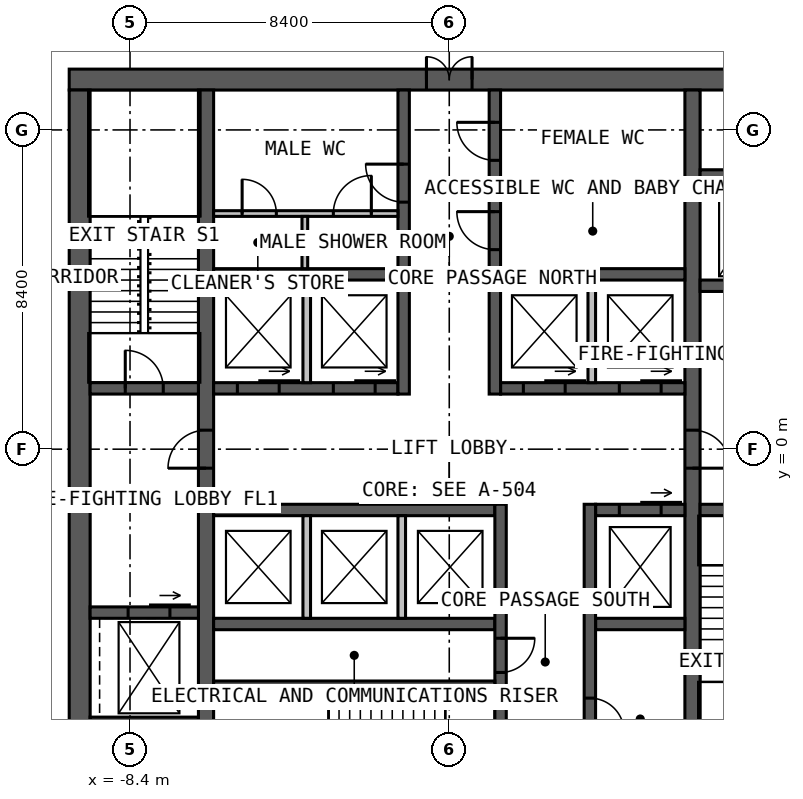
"""IFC4 building model, lengths in metres.
Left out: names, types, materials, properties, quantities, classifications, styles, units other than length and angle.
Written with IfcOpenShell. Run it as: python <this file> out.ifc"""

import sys

from ifc_helpers import new_model, si_unit, direction, frame, frame_2d, origin, place, context, subcontext, project, spatial, rectangle, extrude, element, fill, save


model = new_model("IFC4")
c1 = context("Model", 3, precision=1e-05, world=origin(), true_north=direction((0.0, 1.0)))
c2 = subcontext(c1, "Body", "Model", "MODEL_VIEW")
j1 = project(units=[si_unit("LENGTHUNIT", "METRE"), si_unit("PLANEANGLEUNIT", "RADIAN")], contexts=[c1])
p1 = place(None, origin())
s1 = spatial("IfcSite", under=j1, at=p1, CompositionType="ELEMENT")
p2 = place(p1, origin())
s2 = spatial("IfcBuilding", under=s1, at=p2, CompositionType="ELEMENT")
p3 = place(p2, frame((0.0, 0.0, 142.0)))
s3 = spatial("IfcBuildingStorey", under=s2, at=p3, CompositionType="ELEMENT", Elevation=142.0)
p4 = place(p3, frame((-10.0, 9.725, 0.0), z_axis=(0.0, 0.0, 1.0), x_axis=(1.0, 0.0, 0.0)))
e1 = element("IfcWall", 1, at=p4, inside=s3, PredefinedType="SOLIDWALL", context=c2, shape_type="SweptSolid", body=[
    extrude(rectangle(XDim=20.0, YDim=0.55, at=frame_2d((10.0, 0.0))), origin(), (0.0, 0.0, 1.0), 4.0),
])
p5 = place(p4, frame((9.4, 0.0, 0.0)))
e2 = element("IfcOpeningElement", 2, at=p5, cuts=e1, PredefinedType="OPENING", context=c2, shape_type="SweptSolid", body=[
    extrude(rectangle(XDim=1.2, YDim=2.2, at=frame_2d((0.6, 1.1))), frame((0.0, 0.285, 0.0), z_axis=(0.0, -1.0, 0.0), x_axis=(1.0, 0.0, 0.0)), (0.0, 0.0, 1.0), 0.57),
])
p6 = place(p3, frame((-9.725, 9.45, 0.0), z_axis=(0.0, 0.0, 1.0), x_axis=(0.0, -1.0, 0.0)))
e3 = element("IfcWall", 3, at=p6, inside=s3, PredefinedType="SOLIDWALL", context=c2, shape_type="SweptSolid", body=[
    extrude(rectangle(XDim=18.9, YDim=0.55, at=frame_2d((9.45, 0.0))), origin(), (0.0, 0.0, 1.0), 4.0),
])
p7 = place(p3, frame((-6.4, -9.45, 0.0), z_axis=(0.0, 0.0, 1.0), x_axis=(0.0, 1.0, 0.0)))
e4 = element("IfcWall", 4, at=p7, inside=s3, PredefinedType="SOLIDWALL", context=c2, shape_type="SweptSolid", body=[
    extrude(rectangle(XDim=18.9, YDim=0.4, at=frame_2d((9.45, 0.0))), origin(), (0.0, 0.0, 1.0), 4.0),
])
p8 = place(p7, frame((8.95, 0.0, 0.0)))
e5 = element("IfcOpeningElement", 5, at=p8, cuts=e4, PredefinedType="OPENING", context=c2, shape_type="SweptSolid", body=[
    extrude(rectangle(XDim=1.0, YDim=2.2, at=frame_2d((0.5, 1.1))), frame((0.0, 0.21, 0.0), z_axis=(0.0, -1.0, 0.0), x_axis=(1.0, 0.0, 0.0)), (0.0, 0.0, 1.0), 0.42),
])
p9 = place(p3, frame((6.4, 9.45, 0.0), z_axis=(0.0, 0.0, 1.0), x_axis=(0.0, -1.0, 0.0)))
e6 = element("IfcWall", 6, at=p9, inside=s3, PredefinedType="SOLIDWALL", context=c2, shape_type="SweptSolid", body=[
    extrude(rectangle(XDim=18.9, YDim=0.4, at=frame_2d((9.45, 0.0))), origin(), (0.0, 0.0, 1.0), 4.0),
])
p10 = place(p9, frame((8.95, 0.0, 0.0)))
e7 = element("IfcOpeningElement", 7, at=p10, cuts=e6, PredefinedType="OPENING", context=c2, shape_type="SweptSolid", body=[
    extrude(rectangle(XDim=1.0, YDim=2.2, at=frame_2d((0.5, 1.1))), frame((0.0, 0.21, 0.0), z_axis=(0.0, -1.0, 0.0), x_axis=(1.0, 0.0, 0.0)), (0.0, 0.0, 1.0), 0.42),
])
p11 = place(p3, frame((-6.2, 1.6, 0.0), z_axis=(0.0, 0.0, 1.0), x_axis=(1.0, 0.0, 0.0)))
e8 = element("IfcWall", 8, at=p11, inside=s3, PredefinedType="SOLIDWALL", context=c2, shape_type="SweptSolid", body=[
    extrude(rectangle(XDim=4.85, YDim=0.3, at=frame_2d((2.425, 0.0))), origin(), (0.0, 0.0, 1.0), 4.0),
])
p12 = place(p11, frame((0.625, 0.0, 0.0)))
e9 = element("IfcOpeningElement", 9, at=p12, cuts=e8, PredefinedType="OPENING", context=c2, shape_type="SweptSolid", body=[
    extrude(rectangle(XDim=1.1, YDim=2.2, at=frame_2d((0.55, 1.1))), frame((0.0, 0.16, 0.0), z_axis=(0.0, -1.0, 0.0), x_axis=(1.0, 0.0, 0.0)), (0.0, 0.0, 1.0), 0.32),
])
p13 = place(p11, frame((3.15, 0.0, 0.0)))
e10 = element("IfcOpeningElement", 10, at=p13, cuts=e8, PredefinedType="OPENING", context=c2, shape_type="SweptSolid", body=[
    extrude(rectangle(XDim=1.1, YDim=2.2, at=frame_2d((0.55, 1.1))), frame((0.0, 0.16, 0.0), z_axis=(0.0, -1.0, 0.0), x_axis=(1.0, 0.0, 0.0)), (0.0, 0.0, 1.0), 0.32),
])
p14 = place(p3, frame((1.35, 1.6, 0.0), z_axis=(0.0, 0.0, 1.0), x_axis=(1.0, 0.0, 0.0)))
e11 = element("IfcWall", 11, at=p14, inside=s3, PredefinedType="SOLIDWALL", context=c2, shape_type="SweptSolid", body=[
    extrude(rectangle(XDim=4.85, YDim=0.3, at=frame_2d((2.425, 0.0))), origin(), (0.0, 0.0, 1.0), 4.0),
])
p15 = place(p14, frame((0.6, 0.0, 0.0)))
e12 = element("IfcOpeningElement", 12, at=p15, cuts=e11, PredefinedType="OPENING", context=c2, shape_type="SweptSolid", body=[
    extrude(rectangle(XDim=1.1, YDim=2.2, at=frame_2d((0.55, 1.1))), frame((0.0, 0.16, 0.0), z_axis=(0.0, -1.0, 0.0), x_axis=(1.0, 0.0, 0.0)), (0.0, 0.0, 1.0), 0.32),
])
p16 = place(p14, frame((3.125, 0.0, 0.0)))
e13 = element("IfcOpeningElement", 13, at=p16, cuts=e11, PredefinedType="OPENING", context=c2, shape_type="SweptSolid", body=[
    extrude(rectangle(XDim=1.1, YDim=2.2, at=frame_2d((0.55, 1.1))), frame((0.0, 0.16, 0.0), z_axis=(0.0, -1.0, 0.0), x_axis=(1.0, 0.0, 0.0)), (0.0, 0.0, 1.0), 0.32),
])
for number, where, z_axis, x_axis in (
    (14, (-6.2, 4.6, 0.0), (0.0, 0.0, 1.0), (1.0, 0.0, 0.0)),
    (15, (1.35, 4.6, 0.0), (0.0, 0.0, 1.0), (1.0, 0.0, 0.0)),
):
    element("IfcWall", number, at=place(p3, frame(where, z_axis=z_axis, x_axis=x_axis)), inside=s3, PredefinedType="SOLIDWALL", context=c2, shape_type="SweptSolid", body=[
        extrude(rectangle(XDim=4.85, YDim=0.3, at=frame_2d((2.425, 0.0))), origin(), (0.0, 0.0, 1.0), 4.0),
    ])
p17 = place(p3, frame((-1.2, 1.45, 0.0), z_axis=(0.0, 0.0, 1.0), x_axis=(0.0, 1.0, 0.0)))
e16 = element("IfcWall", 16, at=p17, inside=s3, PredefinedType="SOLIDWALL", context=c2, shape_type="SweptSolid", body=[
    extrude(rectangle(XDim=8.0, YDim=0.3, at=frame_2d((4.0, 0.0))), origin(), (0.0, 0.0, 1.0), 4.0),
])
p18 = place(p17, frame((5.05, 0.0, 0.0)))
e17 = element("IfcOpeningElement", 17, at=p18, cuts=e16, PredefinedType="OPENING", context=c2, shape_type="SweptSolid", body=[
    extrude(rectangle(XDim=1.0, YDim=2.2, at=frame_2d((0.5, 1.1))), frame((0.0, 0.16, 0.0), z_axis=(0.0, -1.0, 0.0), x_axis=(1.0, 0.0, 0.0)), (0.0, 0.0, 1.0), 0.32),
])
p19 = place(p3, frame((1.2, 1.45, 0.0), z_axis=(0.0, 0.0, 1.0), x_axis=(0.0, 1.0, 0.0)))
e18 = element("IfcWall", 18, at=p19, inside=s3, PredefinedType="SOLIDWALL", context=c2, shape_type="SweptSolid", body=[
    extrude(rectangle(XDim=8.0, YDim=0.3, at=frame_2d((4.0, 0.0))), origin(), (0.0, 0.0, 1.0), 4.0),
])
p20 = place(p19, frame((3.8, 0.0, 0.0)))
e19 = element("IfcOpeningElement", 19, at=p20, cuts=e18, PredefinedType="OPENING", context=c2, shape_type="SweptSolid", body=[
    extrude(rectangle(XDim=1.0, YDim=2.2, at=frame_2d((0.5, 1.1))), frame((0.0, 0.16, 0.0), z_axis=(0.0, -1.0, 0.0), x_axis=(1.0, 0.0, 0.0)), (0.0, 0.0, 1.0), 0.32),
])
p21 = place(p19, frame((6.15, 0.0, 0.0)))
e20 = element("IfcOpeningElement", 20, at=p21, cuts=e18, PredefinedType="OPENING", context=c2, shape_type="SweptSolid", body=[
    extrude(rectangle(XDim=1.0, YDim=2.2, at=frame_2d((0.5, 1.1))), frame((0.0, 0.16, 0.0), z_axis=(0.0, -1.0, 0.0), x_axis=(1.0, 0.0, 0.0)), (0.0, 0.0, 1.0), 0.32),
])
p22 = place(p3, frame((-6.2, -1.6, 0.0), z_axis=(0.0, 0.0, 1.0), x_axis=(1.0, 0.0, 0.0)))
e21 = element("IfcWall", 21, at=p22, inside=s3, PredefinedType="SOLIDWALL", context=c2, shape_type="SweptSolid", body=[
    extrude(rectangle(XDim=7.4, YDim=0.3, at=frame_2d((3.7, 0.0))), origin(), (0.0, 0.0, 1.0), 4.0),
])
p23 = place(p3, frame((3.85, -1.6, 0.0), z_axis=(0.0, 0.0, 1.0), x_axis=(1.0, 0.0, 0.0)))
e22 = element("IfcWall", 22, at=p23, inside=s3, PredefinedType="SOLIDWALL", context=c2, shape_type="SweptSolid", body=[
    extrude(rectangle(XDim=2.35, YDim=0.3, at=frame_2d((1.175, 0.0))), origin(), (0.0, 0.0, 1.0), 4.0),
])
p24 = place(p23, frame((0.625, 0.0, 0.0)))
e23 = element("IfcOpeningElement", 23, at=p24, cuts=e22, PredefinedType="OPENING", context=c2, shape_type="SweptSolid", body=[
    extrude(rectangle(XDim=1.1, YDim=2.2, at=frame_2d((0.55, 1.1))), frame((0.0, 0.16, 0.0), z_axis=(0.0, -1.0, 0.0), x_axis=(1.0, 0.0, 0.0)), (0.0, 0.0, 1.0), 0.32),
])
p25 = place(p3, frame((-6.2, -4.6, 0.0), z_axis=(0.0, 0.0, 1.0), x_axis=(1.0, 0.0, 0.0)))
e24 = element("IfcWall", 24, at=p25, inside=s3, PredefinedType="SOLIDWALL", context=c2, shape_type="SweptSolid", body=[
    extrude(rectangle(XDim=7.4, YDim=0.3, at=frame_2d((3.7, 0.0))), origin(), (0.0, 0.0, 1.0), 4.0),
])
p26 = place(p3, frame((3.85, -4.6, 0.0), z_axis=(0.0, 0.0, 1.0), x_axis=(1.0, 0.0, 0.0)))
e25 = element("IfcWall", 25, at=p26, inside=s3, PredefinedType="SOLIDWALL", context=c2, shape_type="SweptSolid", body=[
    extrude(rectangle(XDim=2.35, YDim=0.3, at=frame_2d((1.175, 0.0))), origin(), (0.0, 0.0, 1.0), 4.0),
])
p27 = place(p3, frame((1.35, -1.45, 0.0), z_axis=(0.0, 0.0, 1.0), x_axis=(0.0, -1.0, 0.0)))
e26 = element("IfcWall", 26, at=p27, inside=s3, PredefinedType="SOLIDWALL", context=c2, shape_type="SweptSolid", body=[
    extrude(rectangle(XDim=8.0, YDim=0.3, at=frame_2d((4.0, 0.0))), origin(), (0.0, 0.0, 1.0), 4.0),
])
p28 = place(p27, frame((5.925, 0.0, 0.0)))
e27 = element("IfcOpeningElement", 27, at=p28, cuts=e26, PredefinedType="OPENING", context=c2, shape_type="SweptSolid", body=[
    extrude(rectangle(XDim=1.0, YDim=2.2, at=frame_2d((0.5, 1.1))), frame((0.0, 0.16, 0.0), z_axis=(0.0, -1.0, 0.0), x_axis=(1.0, 0.0, 0.0)), (0.0, 0.0, 1.0), 0.32),
])
p29 = place(p27, frame((3.525, 0.0, 0.0)))
e28 = element("IfcOpeningElement", 28, at=p29, cuts=e26, PredefinedType="OPENING", context=c2, shape_type="SweptSolid", body=[
    extrude(rectangle(XDim=0.9, YDim=2.2, at=frame_2d((0.45, 1.1))), frame((0.0, 0.16, 0.0), z_axis=(0.0, -1.0, 0.0), x_axis=(1.0, 0.0, 0.0)), (0.0, 0.0, 1.0), 0.32),
])
p30 = place(p3, frame((3.7, -1.45, 0.0), z_axis=(0.0, 0.0, 1.0), x_axis=(0.0, -1.0, 0.0)))
e29 = element("IfcWall", 29, at=p30, inside=s3, PredefinedType="SOLIDWALL", context=c2, shape_type="SweptSolid", body=[
    extrude(rectangle(XDim=8.0, YDim=0.3, at=frame_2d((4.0, 0.0))), origin(), (0.0, 0.0, 1.0), 4.0),
])
p31 = place(p30, frame((5.1, 0.0, 0.0)))
e30 = element("IfcOpeningElement", 30, at=p31, cuts=e29, PredefinedType="OPENING", context=c2, shape_type="SweptSolid", body=[
    extrude(rectangle(XDim=0.9, YDim=2.2, at=frame_2d((0.45, 1.1))), frame((0.0, 0.16, 0.0), z_axis=(0.0, -1.0, 0.0), x_axis=(1.0, 0.0, 0.0)), (0.0, 0.0, 1.0), 0.32),
])
p32 = place(p3, frame((-6.2, -6.2, 0.0), z_axis=(0.0, 0.0, 1.0), x_axis=(1.0, 0.0, 0.0)))
e31 = element("IfcWall", 31, at=p32, inside=s3, PredefinedType="SOLIDWALL", context=c2, shape_type="SweptSolid", body=[
    extrude(rectangle(XDim=7.4, YDim=0.2, at=frame_2d((3.7, 0.0))), origin(), (0.0, 0.0, 1.0), 4.0),
])
p33 = place(p3, frame((-9.45, 1.6, 0.0), z_axis=(0.0, 0.0, 1.0), x_axis=(1.0, 0.0, 0.0)))
e32 = element("IfcWall", 32, at=p33, inside=s3, PredefinedType="SOLIDWALL", context=c2, shape_type="SweptSolid", body=[
    extrude(rectangle(XDim=2.85, YDim=0.3, at=frame_2d((1.425, 0.0))), origin(), (0.0, 0.0, 1.0), 4.0),
])
p34 = place(p33, frame((0.925, 0.0, 0.0)))
e33 = element("IfcOpeningElement", 33, at=p34, cuts=e32, PredefinedType="OPENING", context=c2, shape_type="SweptSolid", body=[
    extrude(rectangle(XDim=1.0, YDim=2.2, at=frame_2d((0.5, 1.1))), frame((0.0, 0.16, 0.0), z_axis=(0.0, -1.0, 0.0), x_axis=(1.0, 0.0, 0.0)), (0.0, 0.0, 1.0), 0.32),
])
p35 = place(p3, frame((6.6, -1.6, 0.0), z_axis=(0.0, 0.0, 1.0), x_axis=(1.0, 0.0, 0.0)))
e34 = element("IfcWall", 34, at=p35, inside=s3, PredefinedType="SOLIDWALL", context=c2, shape_type="SweptSolid", body=[
    extrude(rectangle(XDim=2.85, YDim=0.3, at=frame_2d((1.425, 0.0))), origin(), (0.0, 0.0, 1.0), 4.0),
])
p36 = place(p35, frame((0.925, 0.0, 0.0)))
e35 = element("IfcOpeningElement", 35, at=p36, cuts=e34, PredefinedType="OPENING", context=c2, shape_type="SweptSolid", body=[
    extrude(rectangle(XDim=1.0, YDim=2.2, at=frame_2d((0.5, 1.1))), frame((0.0, 0.16, 0.0), z_axis=(0.0, -1.0, 0.0), x_axis=(1.0, 0.0, 0.0)), (0.0, 0.0, 1.0), 0.32),
])
p37 = place(p3, frame((-9.45, -4.3, 0.0), z_axis=(0.0, 0.0, 1.0), x_axis=(1.0, 0.0, 0.0)))
e36 = element("IfcWall", 36, at=p37, inside=s3, PredefinedType="SOLIDWALL", context=c2, shape_type="SweptSolid", body=[
    extrude(rectangle(XDim=2.85, YDim=0.3, at=frame_2d((1.425, 0.0))), origin(), (0.0, 0.0, 1.0), 4.0),
])
p38 = place(p37, frame((1.0, 0.0, 0.0)))
e37 = element("IfcOpeningElement", 37, at=p38, cuts=e36, PredefinedType="OPENING", context=c2, shape_type="SweptSolid", body=[
    extrude(rectangle(XDim=1.1, YDim=2.2, at=frame_2d((0.55, 1.1))), frame((0.0, 0.16, 0.0), z_axis=(0.0, -1.0, 0.0), x_axis=(1.0, 0.0, 0.0)), (0.0, 0.0, 1.0), 0.32),
])
p39 = place(p3, frame((6.6, 4.3, 0.0), z_axis=(0.0, 0.0, 1.0), x_axis=(1.0, 0.0, 0.0)))
e38 = element("IfcWall", 38, at=p39, inside=s3, PredefinedType="SOLIDWALL", context=c2, shape_type="SweptSolid", body=[
    extrude(rectangle(XDim=2.85, YDim=0.3, at=frame_2d((1.425, 0.0))), origin(), (0.0, 0.0, 1.0), 4.0),
])
p40 = place(p39, frame((0.75, 0.0, 0.0)))
e39 = element("IfcOpeningElement", 39, at=p40, cuts=e38, PredefinedType="OPENING", context=c2, shape_type="SweptSolid", body=[
    extrude(rectangle(XDim=1.1, YDim=2.2, at=frame_2d((0.55, 1.1))), frame((0.0, 0.16, 0.0), z_axis=(0.0, -1.0, 0.0), x_axis=(1.0, 0.0, 0.0)), (0.0, 0.0, 1.0), 0.32),
])
for number, where, z_axis, x_axis in (
    (40, (-9.45, -7.2, 0.0), (0.0, 0.0, 1.0), (1.0, 0.0, 0.0)),
    (41, (6.6, 7.2, 0.0), (0.0, 0.0, 1.0), (1.0, 0.0, 0.0)),
):
    element("IfcWall", number, at=place(p3, frame(where, z_axis=z_axis, x_axis=x_axis)), inside=s3, PredefinedType="SOLIDWALL", context=c2, shape_type="SweptSolid", body=[
        extrude(rectangle(XDim=2.85, YDim=0.3, at=frame_2d((1.425, 0.0))), origin(), (0.0, 0.0, 1.0), 4.0),
    ])
for number, where, z_axis, x_axis in (
    (42, (-3.75, 1.75, 0.0), (0.0, 0.0, 1.0), (0.0, 1.0, 0.0)),
    (43, (3.75, 1.75, 0.0), (0.0, 0.0, 1.0), (0.0, 1.0, 0.0)),
    (44, (-3.75, -1.75, 0.0), (0.0, 0.0, 1.0), (0.0, -1.0, 0.0)),
    (45, (-1.25, -1.75, 0.0), (0.0, 0.0, 1.0), (0.0, -1.0, 0.0)),
):
    element("IfcWall", number, at=place(p3, frame(where, z_axis=z_axis, x_axis=x_axis)), inside=s3, PredefinedType="SOLIDWALL", context=c2, shape_type="SweptSolid", body=[
        extrude(rectangle(XDim=2.7, YDim=0.2, at=frame_2d((1.35, 0.0))), origin(), (0.0, 0.0, 1.0), 3.75),
    ])
p41 = place(p3, frame((1.35, 6.8, 0.0), z_axis=(0.0, 0.0, 1.0), x_axis=(1.0, 0.0, 0.0)))
e46 = element("IfcWall", 46, at=p41, inside=s3, PredefinedType="PARTITIONING", context=c2, shape_type="SweptSolid", body=[
    extrude(rectangle(XDim=4.85, YDim=0.15, at=frame_2d((2.425, 0.0))), origin(), (0.0, 0.0, 1.0), 3.75),
])
p42 = place(p3, frame((-6.2, 6.2, 0.0), z_axis=(0.0, 0.0, 1.0), x_axis=(1.0, 0.0, 0.0)))
e47 = element("IfcWall", 47, at=p42, inside=s3, PredefinedType="PARTITIONING", context=c2, shape_type="SweptSolid", body=[
    extrude(rectangle(XDim=4.85, YDim=0.15, at=frame_2d((2.425, 0.0))), origin(), (0.0, 0.0, 1.0), 3.75),
])
p43 = place(p42, frame((3.15, 0.0, 0.0)))
e48 = element("IfcOpeningElement", 48, at=p43, cuts=e47, PredefinedType="OPENING", context=c2, shape_type="SweptSolid", body=[
    extrude(rectangle(XDim=1.0, YDim=2.2, at=frame_2d((0.5, 1.1))), frame((0.0, 0.085, 0.0), z_axis=(0.0, -1.0, 0.0), x_axis=(1.0, 0.0, 0.0)), (0.0, 0.0, 1.0), 0.17),
])
p44 = place(p42, frame((0.75, 0.0, 0.0)))
e49 = element("IfcOpeningElement", 49, at=p44, cuts=e47, PredefinedType="OPENING", context=c2, shape_type="SweptSolid", body=[
    extrude(rectangle(XDim=0.9, YDim=2.2, at=frame_2d((0.45, 1.1))), frame((0.0, 0.085, 0.0), z_axis=(0.0, -1.0, 0.0), x_axis=(1.0, 0.0, 0.0)), (0.0, 0.0, 1.0), 0.17),
])
p45 = place(p3, frame((-3.8, 4.75, 0.0), z_axis=(0.0, 0.0, 1.0), x_axis=(0.0, 1.0, 0.0)))
e50 = element("IfcWall", 50, at=p45, inside=s3, PredefinedType="PARTITIONING", context=c2, shape_type="SweptSolid", body=[
    extrude(rectangle(XDim=1.375, YDim=0.15, at=frame_2d((0.688, 0.0))), origin(), (0.0, 0.0, 1.0), 3.75),
])
p46 = place(p5, origin())
e51 = element("IfcDoor", 51, at=p46, inside=s3, OperationType="DOUBLE_DOOR_SINGLE_SWING", PredefinedType="DOOR", context=c2, shape_type="SweptSolid", body=[
    extrude(rectangle(XDim=1.2, YDim=2.2, at=frame_2d((0.6, 1.1))), frame((0.0, 0.025, 0.0), z_axis=(0.0, -1.0, 0.0), x_axis=(1.0, 0.0, 0.0)), (0.0, 0.0, 1.0), 0.05),
])
fill(e2, e51)
p47 = place(p8, origin())
e52 = element("IfcDoor", 52, at=p47, inside=s3, OperationType="SINGLE_SWING_LEFT", PredefinedType="DOOR", context=c2, shape_type="SweptSolid", body=[
    extrude(rectangle(XDim=1.0, YDim=2.2, at=frame_2d((0.5, 1.1))), frame((0.0, 0.025, 0.0), z_axis=(0.0, -1.0, 0.0), x_axis=(1.0, 0.0, 0.0)), (0.0, 0.0, 1.0), 0.05),
])
fill(e5, e52)
p48 = place(p10, origin())
e53 = element("IfcDoor", 53, at=p48, inside=s3, OperationType="SINGLE_SWING_RIGHT", PredefinedType="DOOR", context=c2, shape_type="SweptSolid", body=[
    extrude(rectangle(XDim=1.0, YDim=2.2, at=frame_2d((0.5, 1.1))), frame((0.0, 0.025, 0.0), z_axis=(0.0, -1.0, 0.0), x_axis=(1.0, 0.0, 0.0)), (0.0, 0.0, 1.0), 0.05),
])
fill(e7, e53)
p49 = place(p34, origin())
e54 = element("IfcDoor", 54, at=p49, inside=s3, OperationType="SINGLE_SWING_LEFT", PredefinedType="DOOR", context=c2, shape_type="SweptSolid", body=[
    extrude(rectangle(XDim=1.0, YDim=2.2, at=frame_2d((0.5, 1.1))), frame((0.0, 0.025, 0.0), z_axis=(0.0, -1.0, 0.0), x_axis=(1.0, 0.0, 0.0)), (0.0, 0.0, 1.0), 0.05),
])
fill(e33, e54)
p50 = place(p18, origin())
e55 = element("IfcDoor", 55, at=p50, inside=s3, OperationType="SINGLE_SWING_RIGHT", PredefinedType="DOOR", context=c2, shape_type="SweptSolid", body=[
    extrude(rectangle(XDim=1.0, YDim=2.2, at=frame_2d((0.5, 1.1))), frame((0.0, 0.025, 0.0), z_axis=(0.0, -1.0, 0.0), x_axis=(1.0, 0.0, 0.0)), (0.0, 0.0, 1.0), 0.05),
])
fill(e17, e55)
p51 = place(p20, origin())
e56 = element("IfcDoor", 56, at=p51, inside=s3, OperationType="SINGLE_SWING_RIGHT", PredefinedType="DOOR", context=c2, shape_type="SweptSolid", body=[
    extrude(rectangle(XDim=1.0, YDim=2.2, at=frame_2d((0.5, 1.1))), frame((0.0, 0.025, 0.0), z_axis=(0.0, -1.0, 0.0), x_axis=(1.0, 0.0, 0.0)), (0.0, 0.0, 1.0), 0.05),
])
fill(e19, e56)
p52 = place(p21, origin())
e57 = element("IfcDoor", 57, at=p52, inside=s3, OperationType="SINGLE_SWING_RIGHT", PredefinedType="DOOR", context=c2, shape_type="SweptSolid", body=[
    extrude(rectangle(XDim=1.0, YDim=2.2, at=frame_2d((0.5, 1.1))), frame((0.0, 0.025, 0.0), z_axis=(0.0, -1.0, 0.0), x_axis=(1.0, 0.0, 0.0)), (0.0, 0.0, 1.0), 0.05),
])
fill(e20, e57)
p53 = place(p29, origin())
e58 = element("IfcDoor", 58, at=p53, inside=s3, OperationType="SINGLE_SWING_LEFT", PredefinedType="DOOR", context=c2, shape_type="SweptSolid", body=[
    extrude(rectangle(XDim=0.9, YDim=2.2, at=frame_2d((0.45, 1.1))), frame((0.0, 0.025, 0.0), z_axis=(0.0, -1.0, 0.0), x_axis=(1.0, 0.0, 0.0)), (0.0, 0.0, 1.0), 0.05),
])
fill(e28, e58)
p54 = place(p31, origin())
e59 = element("IfcDoor", 59, at=p54, inside=s3, OperationType="SINGLE_SWING_RIGHT", PredefinedType="DOOR", context=c2, shape_type="SweptSolid", body=[
    extrude(rectangle(XDim=0.9, YDim=2.2, at=frame_2d((0.45, 1.1))), frame((0.0, 0.025, 0.0), z_axis=(0.0, -1.0, 0.0), x_axis=(1.0, 0.0, 0.0)), (0.0, 0.0, 1.0), 0.05),
])
fill(e30, e59)
p55 = place(p43, origin())
e60 = element("IfcDoor", 60, at=p55, inside=s3, OperationType="SINGLE_SWING_RIGHT", PredefinedType="DOOR", context=c2, shape_type="SweptSolid", body=[
    extrude(rectangle(XDim=1.0, YDim=2.2, at=frame_2d((0.5, 1.1))), frame((0.0, 0.025, 0.0), z_axis=(0.0, -1.0, 0.0), x_axis=(1.0, 0.0, 0.0)), (0.0, 0.0, 1.0), 0.05),
])
fill(e48, e60)
p56 = place(p44, origin())
e61 = element("IfcDoor", 61, at=p56, inside=s3, OperationType="SINGLE_SWING_LEFT", PredefinedType="DOOR", context=c2, shape_type="SweptSolid", body=[
    extrude(rectangle(XDim=0.9, YDim=2.2, at=frame_2d((0.45, 1.1))), frame((0.0, 0.025, 0.0), z_axis=(0.0, -1.0, 0.0), x_axis=(1.0, 0.0, 0.0)), (0.0, 0.0, 1.0), 0.05),
])
fill(e49, e61)
p57 = place(p12, origin())
e62 = element("IfcDoor", 62, at=p57, inside=s3, OperationType="SLIDING_TO_LEFT", PredefinedType="DOOR", context=c2, shape_type="SweptSolid", body=[
    extrude(rectangle(XDim=1.1, YDim=2.2, at=frame_2d((0.55, 1.1))), frame((0.0, 0.025, 0.0), z_axis=(0.0, -1.0, 0.0), x_axis=(1.0, 0.0, 0.0)), (0.0, 0.0, 1.0), 0.05),
])
fill(e9, e62)
p58 = place(p13, origin())
e63 = element("IfcDoor", 63, at=p58, inside=s3, OperationType="SLIDING_TO_LEFT", PredefinedType="DOOR", context=c2, shape_type="SweptSolid", body=[
    extrude(rectangle(XDim=1.1, YDim=2.2, at=frame_2d((0.55, 1.1))), frame((0.0, 0.025, 0.0), z_axis=(0.0, -1.0, 0.0), x_axis=(1.0, 0.0, 0.0)), (0.0, 0.0, 1.0), 0.05),
])
fill(e10, e63)
p59 = place(p15, origin())
e64 = element("IfcDoor", 64, at=p59, inside=s3, OperationType="SLIDING_TO_LEFT", PredefinedType="DOOR", context=c2, shape_type="SweptSolid", body=[
    extrude(rectangle(XDim=1.1, YDim=2.2, at=frame_2d((0.55, 1.1))), frame((0.0, 0.025, 0.0), z_axis=(0.0, -1.0, 0.0), x_axis=(1.0, 0.0, 0.0)), (0.0, 0.0, 1.0), 0.05),
])
fill(e12, e64)
p60 = place(p16, origin())
e65 = element("IfcDoor", 65, at=p60, inside=s3, OperationType="SLIDING_TO_LEFT", PredefinedType="DOOR", context=c2, shape_type="SweptSolid", body=[
    extrude(rectangle(XDim=1.1, YDim=2.2, at=frame_2d((0.55, 1.1))), frame((0.0, 0.025, 0.0), z_axis=(0.0, -1.0, 0.0), x_axis=(1.0, 0.0, 0.0)), (0.0, 0.0, 1.0), 0.05),
])
fill(e13, e65)
p61 = place(p24, origin())
e66 = element("IfcDoor", 66, at=p61, inside=s3, OperationType="SLIDING_TO_LEFT", PredefinedType="DOOR", context=c2, shape_type="SweptSolid", body=[
    extrude(rectangle(XDim=1.1, YDim=2.2, at=frame_2d((0.55, 1.1))), frame((0.0, 0.025, 0.0), z_axis=(0.0, -1.0, 0.0), x_axis=(1.0, 0.0, 0.0)), (0.0, 0.0, 1.0), 0.05),
])
fill(e23, e66)
p62 = place(p38, origin())
e67 = element("IfcDoor", 67, at=p62, inside=s3, OperationType="SLIDING_TO_LEFT", PredefinedType="DOOR", context=c2, shape_type="SweptSolid", body=[
    extrude(rectangle(XDim=1.1, YDim=2.2, at=frame_2d((0.55, 1.1))), frame((0.0, 0.025, 0.0), z_axis=(0.0, -1.0, 0.0), x_axis=(1.0, 0.0, 0.0)), (0.0, 0.0, 1.0), 0.05),
])
fill(e37, e67)
save(model, sys.argv[1])
